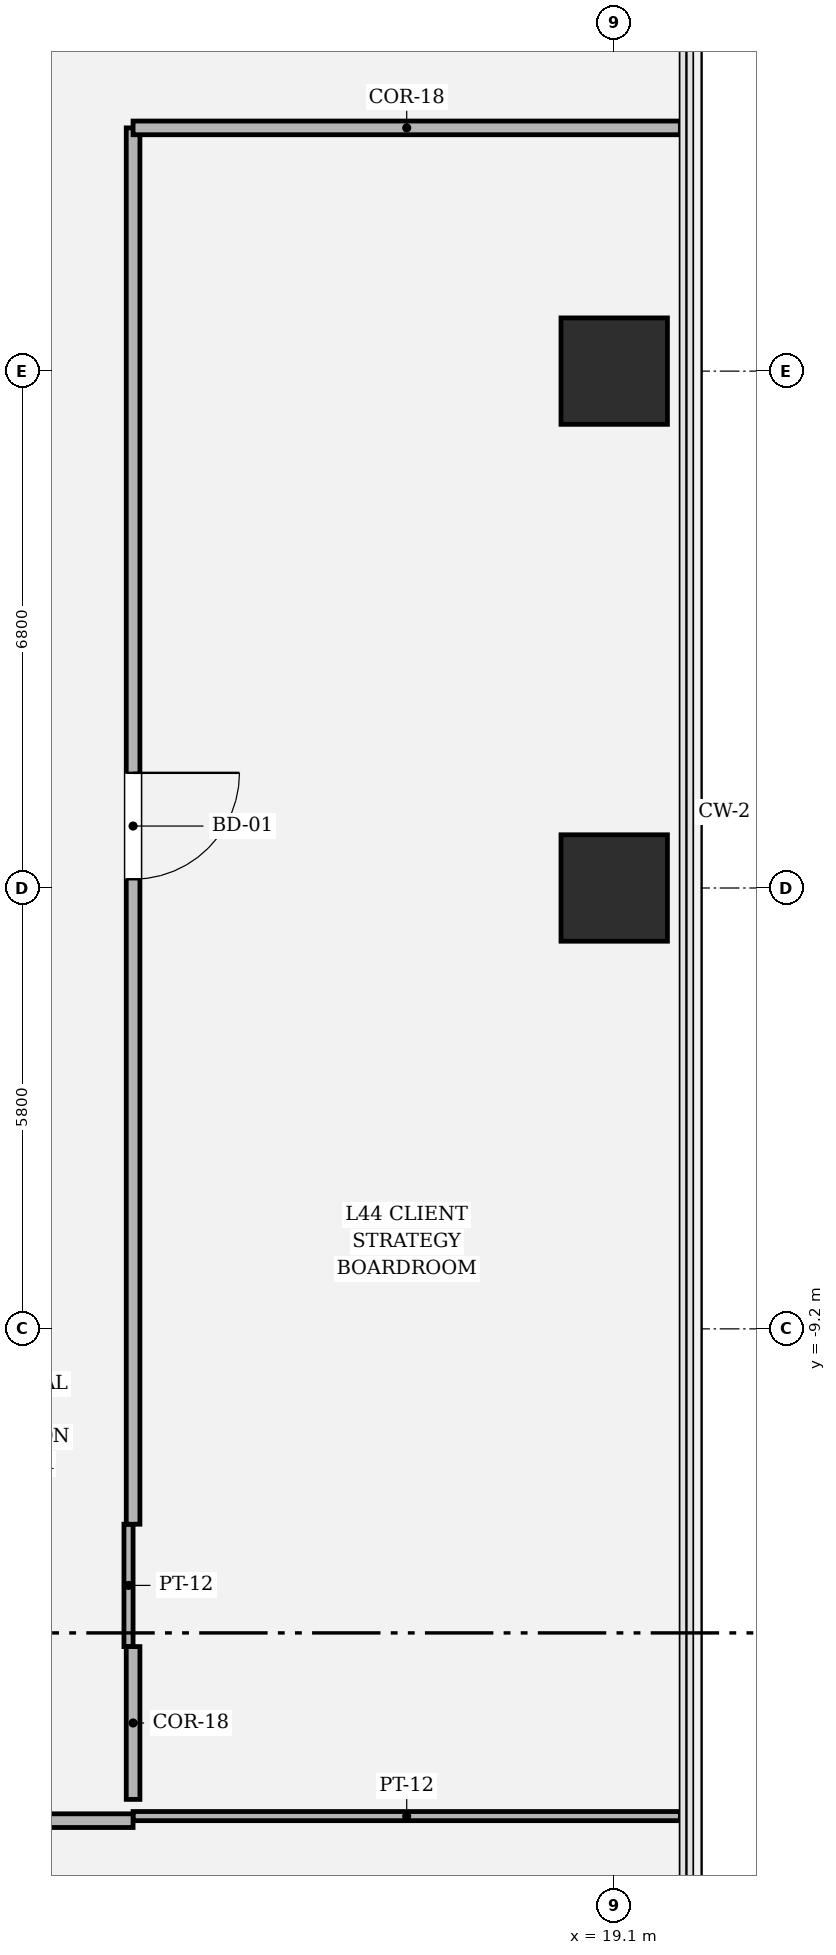
"""IFC4 building model, lengths in metres.
Left out: names, types, materials, properties, quantities, classifications, styles, units other than length and angle.
Written with IfcOpenShell. Run it as: python <this file> out.ifc"""

import sys

from ifc_helpers import new_model, si_unit, direction, frame, frame_2d, origin, origin_2d, place, context, subcontext, project, spatial, rectangle, hollow_rectangle, extrude, element, fill, save


model = new_model("IFC4")
c1 = context("Model", 3, precision=1e-05, world=origin(), true_north=direction((0.0, 1.0)))
c2 = subcontext(c1, "Body", "Model", "MODEL_VIEW")
j1 = project(units=[si_unit("LENGTHUNIT", "METRE"), si_unit("PLANEANGLEUNIT", "RADIAN")], contexts=[c1])
p1 = place(None, origin())
s1 = spatial("IfcSite", under=j1, at=p1, CompositionType="ELEMENT")
p2 = place(p1, origin())
s2 = spatial("IfcBuilding", under=s1, at=p2, CompositionType="ELEMENT")
p3 = place(p2, frame((0.0, 0.0, 188.4)))
s3 = spatial("IfcBuildingStorey", under=s2, at=p3, CompositionType="ELEMENT", Elevation=188.4)
for number, where, z_axis, x_axis in (
    (1, (19.1, -3.4, 0.0), (0.0, 0.0, 1.0), (1.0, 0.0, 0.0)),
    (2, (19.1, 3.4, 0.0), (0.0, 0.0, 1.0), (1.0, 0.0, 0.0)),
):
    element("IfcColumn", number, at=place(p3, frame(where, z_axis=z_axis, x_axis=x_axis)), inside=s3, PredefinedType="COLUMN", context=c2, shape_type="SweptSolid", body=[
        extrude(hollow_rectangle(XDim=1.4, YDim=1.4, WallThickness=0.042, at=origin_2d()), origin(), (0.0, 0.0, 1.0), 4.05),
    ])
p4 = place(p3, frame((12.77, -15.61, 0.0), z_axis=(0.0, 0.0, 1.0), x_axis=(1.0, 0.0, 0.0)))
e3 = element("IfcWall", 3, at=p4, inside=s3, PredefinedType="PARTITIONING", context=c2, shape_type="SweptSolid", body=[
    extrude(rectangle(XDim=7.2, YDim=0.12, at=frame_2d((3.6, 0.0))), origin(), (0.0, 0.0, 1.0), 3.174),
])
p5 = place(p3, frame((-2.34, -15.67, 0.0), z_axis=(0.0, 0.0, 1.0), x_axis=(1.0, 0.0, 0.0)))
e4 = element("IfcWall", 4, at=p5, inside=s3, PredefinedType="PARTITIONING", context=c2, shape_type="SweptSolid", body=[
    extrude(rectangle(XDim=15.11, YDim=0.18, at=frame_2d((7.555, 0.0))), origin(), (0.0, 0.0, 1.0), 3.174),
])
p6 = place(p5, frame((7.03, 0.0, 0.0)))
e5 = element("IfcOpeningElement", 5, at=p6, cuts=e4, PredefinedType="OPENING", context=c2, shape_type="SweptSolid", body=[
    extrude(rectangle(XDim=1.05, YDim=2.2, at=frame_2d((0.525, 1.1))), frame((0.0, 0.1, 0.0), z_axis=(0.0, -1.0, 0.0), x_axis=(1.0, 0.0, 0.0)), (0.0, 0.0, 1.0), 0.2),
])
p7 = place(p3, frame((12.71, -13.38, 0.0), z_axis=(0.0, 0.0, 1.0), x_axis=(0.0, 1.0, 0.0)))
e6 = element("IfcWall", 6, at=p7, inside=s3, PredefinedType="PARTITIONING", context=c2, shape_type="SweptSolid", body=[
    extrude(rectangle(XDim=1.61, YDim=0.12, at=frame_2d((0.805, 0.0))), origin(), (0.0, 0.0, 1.0), 3.424),
])
p8 = place(p3, frame((12.77, -11.77, 0.0), z_axis=(0.0, 0.0, 1.0), x_axis=(0.0, 1.0, 0.0)))
e7 = element("IfcWall", 7, at=p8, inside=s3, PredefinedType="PARTITIONING", context=c2, shape_type="SweptSolid", body=[
    extrude(rectangle(XDim=18.37, YDim=0.18, at=frame_2d((9.185, 0.0))), origin(), (0.0, 0.0, 1.0), 3.174),
])
p9 = place(p8, frame((8.485, 0.0, 0.0)))
e8 = element("IfcOpeningElement", 8, at=p9, cuts=e7, PredefinedType="OPENING", context=c2, shape_type="SweptSolid", body=[
    extrude(rectangle(XDim=1.4, YDim=2.25, at=frame_2d((0.7, 1.125))), frame((0.0, 0.1, 0.0), z_axis=(0.0, -1.0, 0.0), x_axis=(1.0, 0.0, 0.0)), (0.0, 0.0, 1.0), 0.2),
])
p10 = place(p3, frame((12.77, 6.6, 0.0), z_axis=(0.0, 0.0, 1.0), x_axis=(1.0, 0.0, 0.0)))
e9 = element("IfcWall", 9, at=p10, inside=s3, PredefinedType="PARTITIONING", context=c2, shape_type="SweptSolid", body=[
    extrude(rectangle(XDim=7.2, YDim=0.18, at=frame_2d((3.6, 0.0))), origin(), (0.0, 0.0, 1.0), 3.174),
])
p11 = place(p3, frame((12.77, -15.39, 0.0), z_axis=(0.0, 0.0, 1.0), x_axis=(0.0, 1.0, 0.0)))
e10 = element("IfcWall", 10, at=p11, inside=s3, PredefinedType="PARTITIONING", context=c2, shape_type="SweptSolid", body=[
    extrude(rectangle(XDim=2.01, YDim=0.18, at=frame_2d((1.005, 0.0))), origin(), (0.0, 0.0, 1.0), 3.424),
])
p12 = place(p9, origin())
e11 = element("IfcDoor", 11, at=p12, inside=s3, OperationType="SINGLE_SWING_RIGHT", PredefinedType="DOOR", context=c2, shape_type="SweptSolid", body=[
    extrude(rectangle(XDim=1.4, YDim=2.25, at=frame_2d((0.7, 1.125))), frame((0.0, 0.025, 0.0), z_axis=(0.0, -1.0, 0.0), x_axis=(1.0, 0.0, 0.0)), (0.0, 0.0, 1.0), 0.05),
])
fill(e8, e11)
save(model, sys.argv[1])
